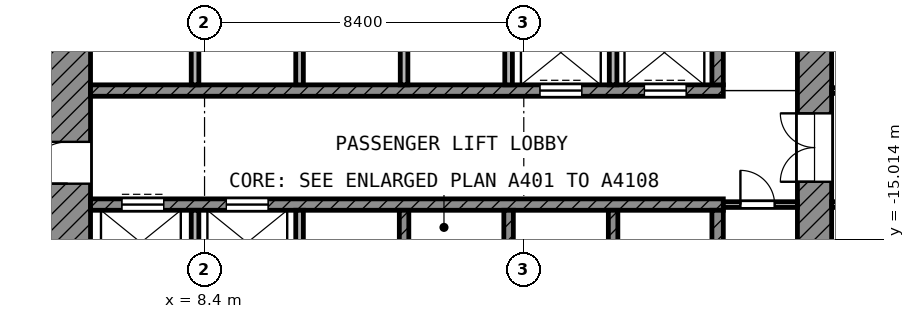
"""IFC4 building model, lengths in metres.
Left out: names, types, materials, properties, quantities, classifications, styles, units other than length and angle.
Written with IfcOpenShell. Run it as: python <this file> out.ifc"""

import sys

from ifc_helpers import new_model, si_unit, direction, frame, frame_2d, origin, place, context, subcontext, project, spatial, rectangle, extrude, element, fill, save


model = new_model("IFC4")
c1 = context("Model", 3, precision=1e-05, world=origin(), true_north=direction((0.0, 1.0)))
c2 = subcontext(c1, "Body", "Model", "MODEL_VIEW")
j1 = project(units=[si_unit("LENGTHUNIT", "METRE"), si_unit("PLANEANGLEUNIT", "RADIAN")], contexts=[c1])
p1 = place(None, origin())
s1 = spatial("IfcSite", under=j1, at=p1, CompositionType="ELEMENT")
p2 = place(p1, origin())
s2 = spatial("IfcBuilding", under=s1, at=p2, CompositionType="ELEMENT")
p3 = place(p2, frame((0.0, 0.0, 162.6)))
s3 = spatial("IfcBuildingStorey", under=s2, at=p3, CompositionType="ELEMENT", Elevation=162.6)
p4 = place(p3, frame((4.8, -24.9, 0.0), z_axis=(0.0, 0.0, 1.0), x_axis=(0.0, 1.0, 0.0)))
e1 = element("IfcWall", 1, at=p4, inside=s3, PredefinedType="SHEAR", context=c2, shape_type="SweptSolid", body=[
    extrude(rectangle(XDim=19.5, YDim=1.2, at=frame_2d((9.75, 0.0))), origin(), (0.0, 0.0, 1.0), 3.6),
])
p5 = place(p4, frame((11.35, 0.0, 0.0)))
e2 = element("IfcOpeningElement", 2, at=p5, cuts=e1, PredefinedType="OPENING", context=c2, shape_type="SweptSolid", body=[
    extrude(rectangle(XDim=1.1, YDim=2.1, at=frame_2d((0.55, 1.05))), frame((0.0, 0.61, 0.0), z_axis=(0.0, -1.0, 0.0), x_axis=(1.0, 0.0, 0.0)), (0.0, 0.0, 1.0), 1.22),
])
p6 = place(p4, frame((2.05, 0.0, 0.0)))
e3 = element("IfcOpeningElement", 3, at=p6, cuts=e1, PredefinedType="OPENING", context=c2, shape_type="SweptSolid", body=[
    extrude(rectangle(XDim=1.1, YDim=2.1, at=frame_2d((0.55, 1.05))), frame((0.0, 0.61, 0.0), z_axis=(0.0, -1.0, 0.0), x_axis=(1.0, 0.0, 0.0)), (0.0, 0.0, 1.0), 1.22),
])
p7 = place(p3, frame((24.45, -24.0, 0.0), z_axis=(0.0, 0.0, 1.0), x_axis=(0.0, 1.0, 0.0)))
e4 = element("IfcWall", 4, at=p7, inside=s3, PredefinedType="SHEAR", context=c2, shape_type="SweptSolid", body=[
    extrude(rectangle(XDim=18.6, YDim=0.9, at=frame_2d((9.3, 0.0))), origin(), (0.0, 0.0, 1.0), 3.6),
])
p8 = place(p7, frame((10.5, 0.0, 0.0)))
e5 = element("IfcOpeningElement", 5, at=p8, cuts=e4, PredefinedType="OPENING", context=c2, shape_type="SweptSolid", body=[
    extrude(rectangle(XDim=1.8, YDim=2.1, at=frame_2d((0.9, 1.05))), frame((0.0, 0.46, 0.0), z_axis=(0.0, -1.0, 0.0), x_axis=(1.0, 0.0, 0.0)), (0.0, 0.0, 1.0), 0.92),
])
p9 = place(p3, frame((5.4, -11.1, 0.0), z_axis=(0.0, 0.0, 1.0), x_axis=(1.0, 0.0, 0.0)))
e6 = element("IfcWall", 6, at=p9, inside=s3, PredefinedType="SHEAR", context=c2, shape_type="SweptSolid", body=[
    extrude(rectangle(XDim=16.65, YDim=0.3, at=frame_2d((8.325, 0.0))), origin(), (0.0, 0.0, 1.0), 3.6),
])
p10 = place(p9, frame((11.825, 0.0, 0.0)))
e7 = element("IfcOpeningElement", 7, at=p10, cuts=e6, PredefinedType="OPENING", context=c2, shape_type="SweptSolid", body=[
    extrude(rectangle(XDim=1.1, YDim=2.1, at=frame_2d((0.55, 1.05))), frame((0.0, 0.16, 0.0), z_axis=(0.0, -1.0, 0.0), x_axis=(1.0, 0.0, 0.0)), (0.0, 0.0, 1.0), 0.32),
])
p11 = place(p9, frame((14.575, 0.0, 0.0)))
e8 = element("IfcOpeningElement", 8, at=p11, cuts=e6, PredefinedType="OPENING", context=c2, shape_type="SweptSolid", body=[
    extrude(rectangle(XDim=1.1, YDim=2.1, at=frame_2d((0.55, 1.05))), frame((0.0, 0.16, 0.0), z_axis=(0.0, -1.0, 0.0), x_axis=(1.0, 0.0, 0.0)), (0.0, 0.0, 1.0), 0.32),
])
p12 = place(p3, frame((5.4, -14.1, 0.0), z_axis=(0.0, 0.0, 1.0), x_axis=(1.0, 0.0, 0.0)))
e9 = element("IfcWall", 9, at=p12, inside=s3, PredefinedType="SHEAR", context=c2, shape_type="SweptSolid", body=[
    extrude(rectangle(XDim=16.65, YDim=0.3, at=frame_2d((8.325, 0.0))), origin(), (0.0, 0.0, 1.0), 3.6),
])
p13 = place(p12, frame((0.825, 0.0, 0.0)))
e10 = element("IfcOpeningElement", 10, at=p13, cuts=e9, PredefinedType="OPENING", context=c2, shape_type="SweptSolid", body=[
    extrude(rectangle(XDim=1.1, YDim=2.1, at=frame_2d((0.55, 1.05))), frame((0.0, 0.16, 0.0), z_axis=(0.0, -1.0, 0.0), x_axis=(1.0, 0.0, 0.0)), (0.0, 0.0, 1.0), 0.32),
])
p14 = place(p12, frame((3.575, 0.0, 0.0)))
e11 = element("IfcOpeningElement", 11, at=p14, cuts=e9, PredefinedType="OPENING", context=c2, shape_type="SweptSolid", body=[
    extrude(rectangle(XDim=1.1, YDim=2.1, at=frame_2d((0.55, 1.05))), frame((0.0, 0.16, 0.0), z_axis=(0.0, -1.0, 0.0), x_axis=(1.0, 0.0, 0.0)), (0.0, 0.0, 1.0), 0.32),
])
p15 = place(p3, frame((21.9, -10.95, 0.0), z_axis=(0.0, 0.0, 1.0), x_axis=(0.0, 1.0, 0.0)))
e12 = element("IfcWall", 12, at=p15, inside=s3, PredefinedType="SHEAR", context=c2, shape_type="SweptSolid", body=[
    extrude(rectangle(XDim=2.35, YDim=0.3, at=frame_2d((1.175, 0.0))), origin(), (0.0, 0.0, 1.0), 3.6),
])
p16 = place(p3, frame((21.9, -16.6, 0.0), z_axis=(0.0, 0.0, 1.0), x_axis=(0.0, 1.0, 0.0)))
e13 = element("IfcWall", 13, at=p16, inside=s3, PredefinedType="SHEAR", context=c2, shape_type="SweptSolid", body=[
    extrude(rectangle(XDim=2.35, YDim=0.3, at=frame_2d((1.175, 0.0))), origin(), (0.0, 0.0, 1.0), 3.6),
])
for number, where, z_axis, x_axis in (
    (14, (8.15, -10.95, 0.0), (0.0, 0.0, 1.0), (0.0, 1.0, 0.0)),
    (15, (10.9, -10.95, 0.0), (0.0, 0.0, 1.0), (0.0, 1.0, 0.0)),
    (16, (13.65, -10.95, 0.0), (0.0, 0.0, 1.0), (0.0, 1.0, 0.0)),
    (17, (16.4, -10.95, 0.0), (0.0, 0.0, 1.0), (0.0, 1.0, 0.0)),
    (18, (19.15, -10.95, 0.0), (0.0, 0.0, 1.0), (0.0, 1.0, 0.0)),
):
    element("IfcWall", number, at=place(p3, frame(where, z_axis=z_axis, x_axis=x_axis)), inside=s3, PredefinedType="PARTITIONING", context=c2, shape_type="SweptSolid", body=[
        extrude(rectangle(XDim=2.35, YDim=0.2, at=frame_2d((1.175, 0.0))), origin(), (0.0, 0.0, 1.0), 3.6),
    ])
for number, where, z_axis, x_axis in (
    (19, (8.15, -16.6, 0.0), (0.0, 0.0, 1.0), (0.0, 1.0, 0.0)),
    (20, (10.9, -16.6, 0.0), (0.0, 0.0, 1.0), (0.0, 1.0, 0.0)),
):
    element("IfcWall", number, at=place(p3, frame(where, z_axis=z_axis, x_axis=x_axis)), inside=s3, PredefinedType="PARTITIONING", context=c2, shape_type="SweptSolid", body=[
        extrude(rectangle(XDim=2.35, YDim=0.2, at=frame_2d((1.175, 0.0))), origin(), (0.0, 0.0, 1.0), 3.6),
    ])
for number, where, z_axis, x_axis in (
    (21, (13.65, -16.6, 0.0), (0.0, 0.0, 1.0), (0.0, 1.0, 0.0)),
    (22, (16.4, -16.6, 0.0), (0.0, 0.0, 1.0), (0.0, 1.0, 0.0)),
    (23, (19.15, -16.6, 0.0), (0.0, 0.0, 1.0), (0.0, 1.0, 0.0)),
):
    element("IfcWall", number, at=place(p3, frame(where, z_axis=z_axis, x_axis=x_axis)), inside=s3, PredefinedType="SHEAR", context=c2, shape_type="SweptSolid", body=[
        extrude(rectangle(XDim=2.35, YDim=0.25, at=frame_2d((1.175, 0.0))), origin(), (0.0, 0.0, 1.0), 3.6),
    ])
p17 = place(p3, frame((22.05, -14.1, 0.0), z_axis=(0.0, 0.0, 1.0), x_axis=(1.0, 0.0, 0.0)))
e24 = element("IfcWall", 24, at=p17, inside=s3, PredefinedType="PARTITIONING", context=c2, shape_type="SweptSolid", body=[
    extrude(rectangle(XDim=1.95, YDim=0.15, at=frame_2d((0.975, 0.0))), origin(), (0.0, 0.0, 1.0), 3.6),
])
p18 = place(p17, frame((0.45, 0.0, 0.0)))
e25 = element("IfcOpeningElement", 25, at=p18, cuts=e24, PredefinedType="OPENING", context=c2, shape_type="SweptSolid", body=[
    extrude(rectangle(XDim=0.9, YDim=2.1, at=frame_2d((0.45, 1.05))), frame((0.0, 0.085, 0.0), z_axis=(0.0, -1.0, 0.0), x_axis=(1.0, 0.0, 0.0)), (0.0, 0.0, 1.0), 0.17),
])
p19 = place(p3, frame((24.9, -14.1, 0.0), z_axis=(0.0, 0.0, 1.0), x_axis=(1.0, 0.0, 0.0)))
e26 = element("IfcWall", 26, at=p19, inside=s3, PredefinedType="PARTITIONING", context=c2, shape_type="SweptSolid", body=[
    extrude(rectangle(XDim=4.425, YDim=0.15, at=frame_2d((2.212, 0.0))), origin(), (0.0, 0.0, 1.0), 3.6),
])
p20 = place(p19, frame((1.9, 0.0, 0.0)))
e27 = element("IfcOpeningElement", 27, at=p20, cuts=e26, PredefinedType="OPENING", context=c2, shape_type="SweptSolid", body=[
    extrude(rectangle(XDim=1.0, YDim=2.1, at=frame_2d((0.5, 1.05))), frame((0.0, 0.085, 0.0), z_axis=(0.0, -1.0, 0.0), x_axis=(1.0, 0.0, 0.0)), (0.0, 0.0, 1.0), 0.17),
])
p21 = place(p3, frame((24.9, -11.1, 0.0), z_axis=(0.0, 0.0, 1.0), x_axis=(1.0, 0.0, 0.0)))
e28 = element("IfcWall", 28, at=p21, inside=s3, PredefinedType="PARTITIONING", context=c2, shape_type="SweptSolid", body=[
    extrude(rectangle(XDim=4.498, YDim=0.15, at=frame_2d((2.249, 0.0))), origin(), (0.0, 0.0, 1.0), 3.6),
])
p22 = place(p21, frame((1.799, 0.0, 0.0)))
e29 = element("IfcOpeningElement", 29, at=p22, cuts=e28, PredefinedType="OPENING", context=c2, shape_type="SweptSolid", body=[
    extrude(rectangle(XDim=1.2, YDim=2.1, at=frame_2d((0.6, 1.05))), frame((0.0, 0.085, 0.0), z_axis=(0.0, -1.0, 0.0), x_axis=(1.0, 0.0, 0.0)), (0.0, 0.0, 1.0), 0.17),
])
p23 = place(p10, origin())
e30 = element("IfcDoor", 30, at=p23, inside=s3, OperationType="DOUBLE_DOOR_SLIDING", PredefinedType="DOOR", context=c2, shape_type="SweptSolid", body=[
    extrude(rectangle(XDim=1.1, YDim=2.1, at=frame_2d((0.55, 1.05))), frame((0.0, 0.025, 0.0), z_axis=(0.0, -1.0, 0.0), x_axis=(1.0, 0.0, 0.0)), (0.0, 0.0, 1.0), 0.05),
])
fill(e7, e30)
p24 = place(p11, origin())
e31 = element("IfcDoor", 31, at=p24, inside=s3, OperationType="DOUBLE_DOOR_SLIDING", PredefinedType="DOOR", context=c2, shape_type="SweptSolid", body=[
    extrude(rectangle(XDim=1.1, YDim=2.1, at=frame_2d((0.55, 1.05))), frame((0.0, 0.025, 0.0), z_axis=(0.0, -1.0, 0.0), x_axis=(1.0, 0.0, 0.0)), (0.0, 0.0, 1.0), 0.05),
])
fill(e8, e31)
p25 = place(p13, origin())
e32 = element("IfcDoor", 32, at=p25, inside=s3, OperationType="DOUBLE_DOOR_SLIDING", PredefinedType="DOOR", context=c2, shape_type="SweptSolid", body=[
    extrude(rectangle(XDim=1.1, YDim=2.1, at=frame_2d((0.55, 1.05))), frame((0.0, 0.025, 0.0), z_axis=(0.0, -1.0, 0.0), x_axis=(1.0, 0.0, 0.0)), (0.0, 0.0, 1.0), 0.05),
])
fill(e10, e32)
p26 = place(p14, origin())
e33 = element("IfcDoor", 33, at=p26, inside=s3, OperationType="DOUBLE_DOOR_SLIDING", PredefinedType="DOOR", context=c2, shape_type="SweptSolid", body=[
    extrude(rectangle(XDim=1.1, YDim=2.1, at=frame_2d((0.55, 1.05))), frame((0.0, 0.025, 0.0), z_axis=(0.0, -1.0, 0.0), x_axis=(1.0, 0.0, 0.0)), (0.0, 0.0, 1.0), 0.05),
])
fill(e11, e33)
p27 = place(p5, origin())
e34 = element("IfcDoor", 34, at=p27, inside=s3, OperationType="SINGLE_SWING_LEFT", PredefinedType="DOOR", context=c2, shape_type="SweptSolid", body=[
    extrude(rectangle(XDim=1.1, YDim=2.1, at=frame_2d((0.55, 1.05))), frame((0.0, 0.025, 0.0), z_axis=(0.0, -1.0, 0.0), x_axis=(1.0, 0.0, 0.0)), (0.0, 0.0, 1.0), 0.05),
])
fill(e2, e34)
p28 = place(p8, origin())
e35 = element("IfcDoor", 35, at=p28, inside=s3, OperationType="DOUBLE_DOOR_SINGLE_SWING", PredefinedType="DOOR", context=c2, shape_type="SweptSolid", body=[
    extrude(rectangle(XDim=1.8, YDim=2.1, at=frame_2d((0.9, 1.05))), frame((0.0, 0.025, 0.0), z_axis=(0.0, -1.0, 0.0), x_axis=(1.0, 0.0, 0.0)), (0.0, 0.0, 1.0), 0.05),
])
fill(e5, e35)
p29 = place(p18, origin())
e36 = element("IfcDoor", 36, at=p29, inside=s3, OperationType="SINGLE_SWING_LEFT", PredefinedType="DOOR", context=c2, shape_type="SweptSolid", body=[
    extrude(rectangle(XDim=0.9, YDim=2.1, at=frame_2d((0.45, 1.05))), frame((0.0, 0.025, 0.0), z_axis=(0.0, -1.0, 0.0), x_axis=(1.0, 0.0, 0.0)), (0.0, 0.0, 1.0), 0.05),
])
fill(e25, e36)
save(model, sys.argv[1])
